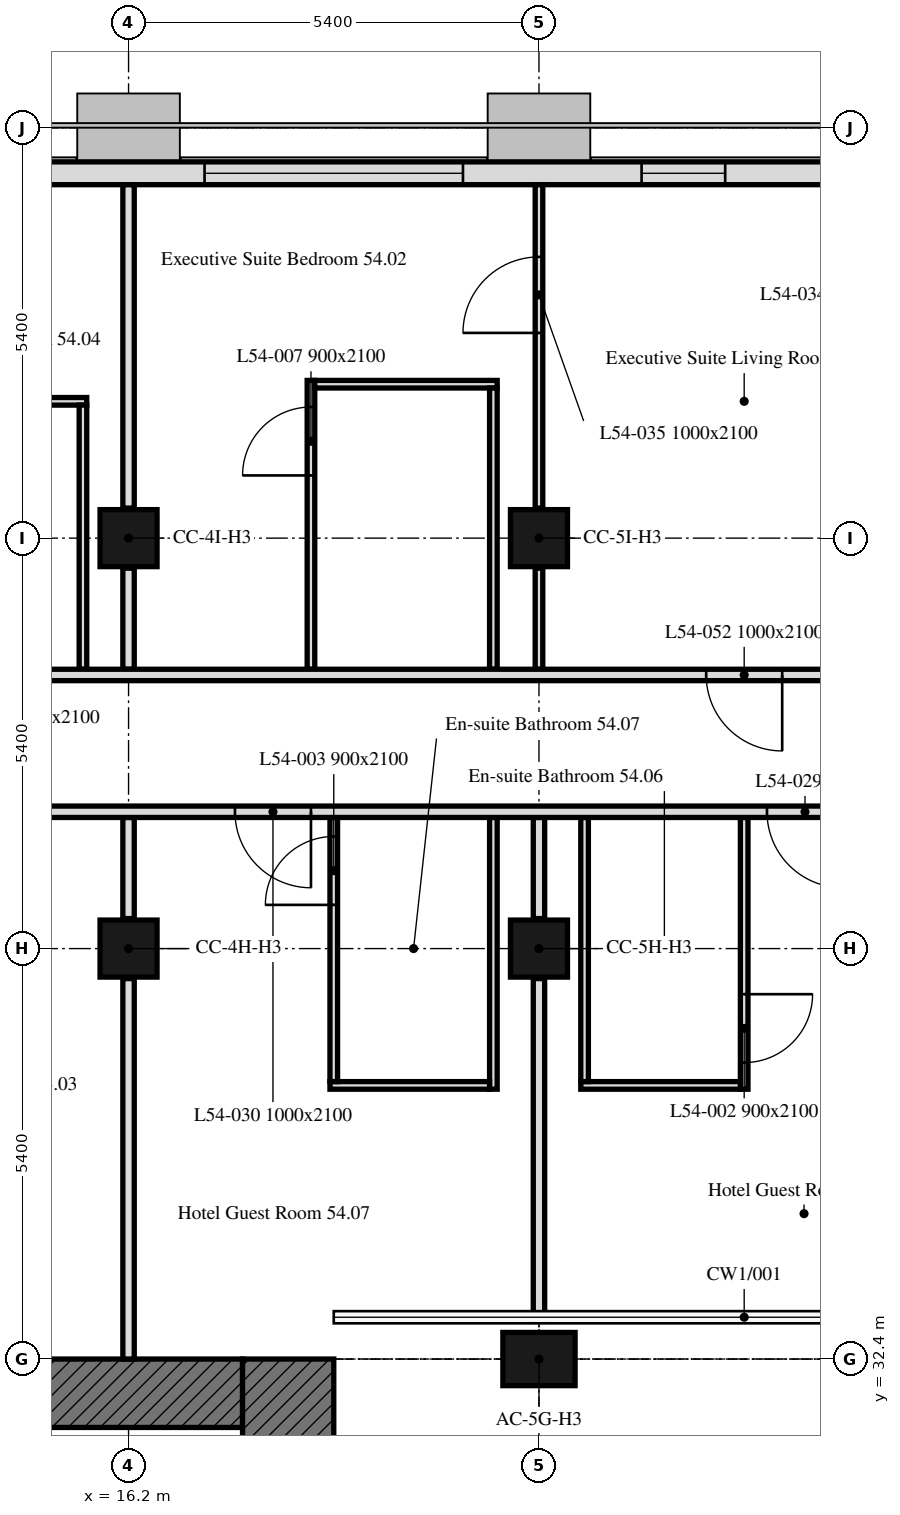
"""IFC4 building model, lengths in metres.
Left out: names, types, materials, properties, quantities, classifications, styles, units other than length and angle.
Written with IfcOpenShell. Run it as: python <this file> out.ifc"""

import sys

from ifc_helpers import new_model, si_unit, direction, frame, frame_2d, origin, origin_2d, place, context, subcontext, project, spatial, rectangle, extrude, element, fill, save


model = new_model("IFC4")
c1 = context("Model", 3, precision=1e-05, world=origin(), true_north=direction((0.0, 1.0)))
c2 = subcontext(c1, "Body", "Model", "MODEL_VIEW")
j1 = project(units=[si_unit("LENGTHUNIT", "METRE"), si_unit("PLANEANGLEUNIT", "RADIAN")], contexts=[c1])
p1 = place(None, origin())
s1 = spatial("IfcSite", under=j1, at=p1, CompositionType="ELEMENT")
p2 = place(p1, origin())
s2 = spatial("IfcBuilding", under=s1, at=p2, CompositionType="ELEMENT")
p3 = place(p2, frame((0.0, 0.0, 217.0)))
s3 = spatial("IfcBuildingStorey", under=s2, at=p3, CompositionType="ELEMENT", Elevation=217.0)
p4 = place(p3, frame((21.6, 32.4, 0.0), z_axis=(0.0, 0.0, 1.0), x_axis=(1.0, 0.0, 0.0)))
e1 = element("IfcColumn", 1, at=p4, inside=s3, PredefinedType="COLUMN", context=c2, shape_type="SweptSolid", body=[
    extrude(rectangle(XDim=0.95, YDim=0.7, at=origin_2d()), origin(), (0.0, 0.0, 1.0), 3.0),
])
for number, where, z_axis, x_axis in (
    (2, (16.2, 37.8, 0.0), (0.0, 0.0, 1.0), (1.0, 0.0, 0.0)),
    (3, (21.6, 37.8, 0.0), (0.0, 0.0, 1.0), (1.0, 0.0, 0.0)),
    (4, (16.2, 43.2, 0.0), (0.0, 0.0, 1.0), (1.0, 0.0, 0.0)),
    (5, (21.6, 43.2, 0.0), (0.0, 0.0, 1.0), (1.0, 0.0, 0.0)),
):
    element("IfcColumn", number, at=place(p3, frame(where, z_axis=z_axis, x_axis=x_axis)), inside=s3, PredefinedType="COLUMN", context=c2, shape_type="SweptSolid", body=[
        extrude(rectangle(XDim=0.75, YDim=0.75, at=origin_2d()), origin(), (0.0, 0.0, 1.0), 3.0),
    ])
p5 = place(p3, frame((37.614, 48.0, 0.0), z_axis=(0.0, 0.0, 1.0), x_axis=(-1.0, 0.0, 0.0)))
e6 = element("IfcWall", 6, at=p5, inside=s3, PredefinedType="SOLIDWALL", context=c2, shape_type="SweptSolid", body=[
    extrude(rectangle(XDim=32.027, YDim=0.3, at=frame_2d((16.014, 0.0))), origin(), (0.0, 0.0, 1.0), 3.0),
])
p6 = place(p5, frame((2.764, 0.0, 0.9)))
e7 = element("IfcOpeningElement", 7, at=p6, cuts=e6, PredefinedType="OPENING", context=c2, shape_type="SweptSolid", body=[
    extrude(rectangle(XDim=1.1, YDim=1.7, at=frame_2d((0.55, 0.85))), frame((0.0, 0.16, 0.0), z_axis=(0.0, -1.0, 0.0), x_axis=(1.0, 0.0, 0.0)), (0.0, 0.0, 1.0), 0.32),
])
p7 = place(p5, frame((6.214, 0.0, 0.9)))
e8 = element("IfcOpeningElement", 8, at=p7, cuts=e6, PredefinedType="OPENING", context=c2, shape_type="SweptSolid", body=[
    extrude(rectangle(XDim=3.4, YDim=1.7, at=frame_2d((1.7, 0.85))), frame((0.0, 0.16, 0.0), z_axis=(0.0, -1.0, 0.0), x_axis=(1.0, 0.0, 0.0)), (0.0, 0.0, 1.0), 0.32),
])
p8 = place(p5, frame((13.564, 0.0, 0.9)))
e9 = element("IfcOpeningElement", 9, at=p8, cuts=e6, PredefinedType="OPENING", context=c2, shape_type="SweptSolid", body=[
    extrude(rectangle(XDim=1.1, YDim=1.7, at=frame_2d((0.55, 0.85))), frame((0.0, 0.16, 0.0), z_axis=(0.0, -1.0, 0.0), x_axis=(1.0, 0.0, 0.0)), (0.0, 0.0, 1.0), 0.32),
])
p9 = place(p5, frame((17.014, 0.0, 0.9)))
e10 = element("IfcOpeningElement", 10, at=p9, cuts=e6, PredefinedType="OPENING", context=c2, shape_type="SweptSolid", body=[
    extrude(rectangle(XDim=3.4, YDim=1.7, at=frame_2d((1.7, 0.85))), frame((0.0, 0.16, 0.0), z_axis=(0.0, -1.0, 0.0), x_axis=(1.0, 0.0, 0.0)), (0.0, 0.0, 1.0), 0.32),
])
p10 = place(p5, frame((24.364, 0.0, 0.9)))
e11 = element("IfcOpeningElement", 11, at=p10, cuts=e6, PredefinedType="OPENING", context=c2, shape_type="SweptSolid", body=[
    extrude(rectangle(XDim=1.1, YDim=1.7, at=frame_2d((0.55, 0.85))), frame((0.0, 0.16, 0.0), z_axis=(0.0, -1.0, 0.0), x_axis=(1.0, 0.0, 0.0)), (0.0, 0.0, 1.0), 0.32),
])
p11 = place(p5, frame((27.814, 0.0, 0.9)))
e12 = element("IfcOpeningElement", 12, at=p11, cuts=e6, PredefinedType="OPENING", context=c2, shape_type="SweptSolid", body=[
    extrude(rectangle(XDim=3.4, YDim=1.7, at=frame_2d((1.7, 0.85))), frame((0.0, 0.16, 0.0), z_axis=(0.0, -1.0, 0.0), x_axis=(1.0, 0.0, 0.0)), (0.0, 0.0, 1.0), 0.32),
])
p12 = place(p3, frame((6.6, 31.95, 0.0), z_axis=(0.0, 0.0, 1.0), x_axis=(1.0, 0.0, 0.0)))
e13 = element("IfcWall", 13, at=p12, inside=s3, PredefinedType="SOLIDWALL", context=c2, shape_type="SweptSolid", body=[
    extrude(rectangle(XDim=11.1, YDim=0.9, at=frame_2d((5.55, 0.0))), origin(), (0.0, 0.0, 1.0), 3.0),
])
p13 = place(p12, frame((3.55, 0.0, 0.0)))
e14 = element("IfcOpeningElement", 14, at=p13, cuts=e13, PredefinedType="OPENING", context=c2, shape_type="SweptSolid", body=[
    extrude(rectangle(XDim=2.0, YDim=2.4, at=frame_2d((1.0, 1.2))), frame((0.0, 0.45, 0.0), z_axis=(0.0, -1.0, 0.0), x_axis=(1.0, 0.0, 0.0)), (0.0, 0.0, 1.0), 0.9),
])
p14 = place(p3, frame((18.3, 32.4, 0.0), z_axis=(0.0, 0.0, 1.0), x_axis=(0.0, -1.0, 0.0)))
e15 = element("IfcWall", 15, at=p14, inside=s3, PredefinedType="SOLIDWALL", context=c2, shape_type="SweptSolid", body=[
    extrude(rectangle(XDim=16.2, YDim=1.2, at=frame_2d((8.1, 0.0))), origin(), (0.0, 0.0, 1.0), 3.0),
])
p15 = place(p3, frame((24.3, 39.525, 0.0), z_axis=(0.0, 0.0, 1.0), x_axis=(0.0, -1.0, 0.0)))
e16 = element("IfcWall", 16, at=p15, inside=s3, PredefinedType="PARTITIONING", context=c2, shape_type="SweptSolid", body=[
    extrude(rectangle(XDim=3.575, YDim=0.1, at=frame_2d((1.788, 0.0))), origin(), (0.0, 0.0, 1.0), 3.0),
])
p16 = place(p15, frame((2.325, 0.0, 0.0)))
e17 = element("IfcOpeningElement", 17, at=p16, cuts=e16, PredefinedType="OPENING", context=c2, shape_type="SweptSolid", body=[
    extrude(rectangle(XDim=0.9, YDim=2.1, at=frame_2d((0.45, 1.05))), frame((0.0, 0.05, 0.0), z_axis=(0.0, -1.0, 0.0), x_axis=(1.0, 0.0, 0.0)), (0.0, 0.0, 1.0), 0.1),
])
p17 = place(p3, frame((24.25, 36.0, 0.0), z_axis=(0.0, 0.0, 1.0), x_axis=(-1.0, 0.0, 0.0)))
e18 = element("IfcWall", 18, at=p17, inside=s3, PredefinedType="PARTITIONING", context=c2, shape_type="SweptSolid", body=[
    extrude(rectangle(XDim=2.1, YDim=0.1, at=frame_2d((1.05, 0.0))), origin(), (0.0, 0.0, 1.0), 3.0),
])
p18 = place(p3, frame((22.2, 36.05, 0.0), z_axis=(0.0, 0.0, 1.0), x_axis=(0.0, 1.0, 0.0)))
e19 = element("IfcWall", 19, at=p18, inside=s3, PredefinedType="PARTITIONING", context=c2, shape_type="SweptSolid", body=[
    extrude(rectangle(XDim=3.475, YDim=0.1, at=frame_2d((1.737, 0.0))), origin(), (0.0, 0.0, 1.0), 3.0),
])
p19 = place(p3, frame((21.6, 39.525, 0.0), z_axis=(0.0, 0.0, 1.0), x_axis=(0.0, -1.0, 0.0)))
e20 = element("IfcWall", 20, at=p19, inside=s3, PredefinedType="PARTITIONING", context=c2, shape_type="SweptSolid", body=[
    extrude(rectangle(XDim=1.33, YDim=0.15, at=frame_2d((0.665, 0.0))), origin(), (0.0, 0.0, 1.0), 2.4),
])
p20 = place(p3, frame((21.6, 37.405, 0.0), z_axis=(0.0, 0.0, 1.0), x_axis=(0.0, -1.0, 0.0)))
e21 = element("IfcWall", 21, at=p20, inside=s3, PredefinedType="PARTITIONING", context=c2, shape_type="SweptSolid", body=[
    extrude(rectangle(XDim=4.51, YDim=0.15, at=frame_2d((2.255, 0.0))), origin(), (0.0, 0.0, 1.0), 2.4),
])
p21 = place(p3, frame((21.0, 39.525, 0.0), z_axis=(0.0, 0.0, 1.0), x_axis=(0.0, -1.0, 0.0)))
e22 = element("IfcWall", 22, at=p21, inside=s3, PredefinedType="PARTITIONING", context=c2, shape_type="SweptSolid", body=[
    extrude(rectangle(XDim=3.575, YDim=0.1, at=frame_2d((1.788, 0.0))), origin(), (0.0, 0.0, 1.0), 3.0),
])
p22 = place(p3, frame((20.95, 36.0, 0.0), z_axis=(0.0, 0.0, 1.0), x_axis=(-1.0, 0.0, 0.0)))
e23 = element("IfcWall", 23, at=p22, inside=s3, PredefinedType="PARTITIONING", context=c2, shape_type="SweptSolid", body=[
    extrude(rectangle(XDim=2.1, YDim=0.1, at=frame_2d((1.05, 0.0))), origin(), (0.0, 0.0, 1.0), 3.0),
])
p23 = place(p3, frame((18.9, 36.05, 0.0), z_axis=(0.0, 0.0, 1.0), x_axis=(0.0, 1.0, 0.0)))
e24 = element("IfcWall", 24, at=p23, inside=s3, PredefinedType="PARTITIONING", context=c2, shape_type="SweptSolid", body=[
    extrude(rectangle(XDim=3.475, YDim=0.1, at=frame_2d((1.737, 0.0))), origin(), (0.0, 0.0, 1.0), 3.0),
])
p24 = place(p23, frame((2.325, 0.0, 0.0)))
e25 = element("IfcOpeningElement", 25, at=p24, cuts=e24, PredefinedType="OPENING", context=c2, shape_type="SweptSolid", body=[
    extrude(rectangle(XDim=0.9, YDim=2.1, at=frame_2d((0.45, 1.05))), frame((0.0, 0.05, 0.0), z_axis=(0.0, -1.0, 0.0), x_axis=(1.0, 0.0, 0.0)), (0.0, 0.0, 1.0), 0.1),
])
p25 = place(p3, frame((16.2, 39.525, 0.0), z_axis=(0.0, 0.0, 1.0), x_axis=(0.0, -1.0, 0.0)))
e26 = element("IfcWall", 26, at=p25, inside=s3, PredefinedType="PARTITIONING", context=c2, shape_type="SweptSolid", body=[
    extrude(rectangle(XDim=1.33, YDim=0.15, at=frame_2d((0.665, 0.0))), origin(), (0.0, 0.0, 1.0), 2.4),
])
p26 = place(p3, frame((16.2, 37.405, 0.0), z_axis=(0.0, 0.0, 1.0), x_axis=(0.0, -1.0, 0.0)))
e27 = element("IfcWall", 27, at=p26, inside=s3, PredefinedType="PARTITIONING", context=c2, shape_type="SweptSolid", body=[
    extrude(rectangle(XDim=5.005, YDim=0.15, at=frame_2d((2.502, 0.0))), origin(), (0.0, 0.0, 1.0), 2.4),
])
p27 = place(p3, frame((16.2, 47.849, 0.0), z_axis=(0.0, 0.0, 1.0), x_axis=(0.0, -1.0, 0.0)))
e28 = element("IfcWall", 28, at=p27, inside=s3, PredefinedType="PARTITIONING", context=c2, shape_type="SweptSolid", body=[
    extrude(rectangle(XDim=4.254, YDim=0.15, at=frame_2d((2.127, 0.0))), origin(), (0.0, 0.0, 1.0), 2.4),
])
p28 = place(p3, frame((16.2, 42.805, 0.0), z_axis=(0.0, 0.0, 1.0), x_axis=(0.0, -1.0, 0.0)))
e29 = element("IfcWall", 29, at=p28, inside=s3, PredefinedType="PARTITIONING", context=c2, shape_type="SweptSolid", body=[
    extrude(rectangle(XDim=1.33, YDim=0.15, at=frame_2d((0.665, 0.0))), origin(), (0.0, 0.0, 1.0), 2.4),
])
p29 = place(p3, frame((18.6, 41.475, 0.0), z_axis=(0.0, 0.0, 1.0), x_axis=(0.0, 1.0, 0.0)))
e30 = element("IfcWall", 30, at=p29, inside=s3, PredefinedType="PARTITIONING", context=c2, shape_type="SweptSolid", body=[
    extrude(rectangle(XDim=3.8, YDim=0.1, at=frame_2d((1.9, 0.0))), origin(), (0.0, 0.0, 1.0), 3.0),
])
p30 = place(p29, frame((2.55, 0.0, 0.0)))
e31 = element("IfcOpeningElement", 31, at=p30, cuts=e30, PredefinedType="OPENING", context=c2, shape_type="SweptSolid", body=[
    extrude(rectangle(XDim=0.9, YDim=2.1, at=frame_2d((0.45, 1.05))), frame((0.0, 0.05, 0.0), z_axis=(0.0, -1.0, 0.0), x_axis=(1.0, 0.0, 0.0)), (0.0, 0.0, 1.0), 0.1),
])
p31 = place(p3, frame((18.65, 45.225, 0.0), z_axis=(0.0, 0.0, 1.0), x_axis=(1.0, 0.0, 0.0)))
e32 = element("IfcWall", 32, at=p31, inside=s3, PredefinedType="PARTITIONING", context=c2, shape_type="SweptSolid", body=[
    extrude(rectangle(XDim=2.4, YDim=0.1, at=frame_2d((1.2, 0.0))), origin(), (0.0, 0.0, 1.0), 3.0),
])
p32 = place(p3, frame((21.0, 45.175, 0.0), z_axis=(0.0, 0.0, 1.0), x_axis=(0.0, -1.0, 0.0)))
e33 = element("IfcWall", 33, at=p32, inside=s3, PredefinedType="PARTITIONING", context=c2, shape_type="SweptSolid", body=[
    extrude(rectangle(XDim=3.7, YDim=0.1, at=frame_2d((1.85, 0.0))), origin(), (0.0, 0.0, 1.0), 3.0),
])
p33 = place(p3, frame((21.6, 41.475, 0.0), z_axis=(0.0, 0.0, 1.0), x_axis=(0.0, 1.0, 0.0)))
e34 = element("IfcWall", 34, at=p33, inside=s3, PredefinedType="PARTITIONING", context=c2, shape_type="SweptSolid", body=[
    extrude(rectangle(XDim=1.33, YDim=0.1, at=frame_2d((0.665, 0.0))), origin(), (0.0, 0.0, 1.0), 2.4),
])
p34 = place(p3, frame((21.6, 43.595, 0.0), z_axis=(0.0, 0.0, 1.0), x_axis=(0.0, 1.0, 0.0)))
e35 = element("IfcWall", 35, at=p34, inside=s3, PredefinedType="PARTITIONING", context=c2, shape_type="SweptSolid", body=[
    extrude(rectangle(XDim=4.254, YDim=0.1, at=frame_2d((2.127, 0.0))), origin(), (0.0, 0.0, 1.0), 2.4),
])
p35 = place(p34, frame((2.305, 0.0, 0.0)))
e36 = element("IfcOpeningElement", 36, at=p35, cuts=e35, PredefinedType="OPENING", context=c2, shape_type="SweptSolid", body=[
    extrude(rectangle(XDim=1.0, YDim=2.1, at=frame_2d((0.5, 1.05))), frame((0.0, 0.05, 0.0), z_axis=(0.0, -1.0, 0.0), x_axis=(1.0, 0.0, 0.0)), (0.0, 0.0, 1.0), 0.1),
])
p36 = place(p3, frame((13.55, 45.0, 0.0), z_axis=(0.0, 0.0, 1.0), x_axis=(1.0, 0.0, 0.0)))
e37 = element("IfcWall", 37, at=p36, inside=s3, PredefinedType="PARTITIONING", context=c2, shape_type="SweptSolid", body=[
    extrude(rectangle(XDim=2.1, YDim=0.1, at=frame_2d((1.05, 0.0))), origin(), (0.0, 0.0, 1.0), 3.0),
])
p37 = place(p3, frame((15.6, 44.95, 0.0), z_axis=(0.0, 0.0, 1.0), x_axis=(0.0, -1.0, 0.0)))
e38 = element("IfcWall", 38, at=p37, inside=s3, PredefinedType="PARTITIONING", context=c2, shape_type="SweptSolid", body=[
    extrude(rectangle(XDim=3.475, YDim=0.1, at=frame_2d((1.737, 0.0))), origin(), (0.0, 0.0, 1.0), 3.0),
])
p38 = place(p3, frame((42.449, 41.4, 0.0), z_axis=(0.0, 0.0, 1.0), x_axis=(-1.0, 0.0, 0.0)))
e39 = element("IfcWall", 39, at=p38, inside=s3, PredefinedType="PARTITIONING", context=c2, shape_type="SweptSolid", body=[
    extrude(rectangle(XDim=41.698, YDim=0.15, at=frame_2d((20.849, 0.0))), origin(), (0.0, 0.0, 1.0), 2.4),
])
p39 = place(p38, frame((1.449, 0.0, 0.0)))
e40 = element("IfcOpeningElement", 40, at=p39, cuts=e39, PredefinedType="OPENING", context=c2, shape_type="SweptSolid", body=[
    extrude(rectangle(XDim=1.0, YDim=2.1, at=frame_2d((0.5, 1.05))), frame((0.0, 0.075, 0.0), z_axis=(0.0, -1.0, 0.0), x_axis=(1.0, 0.0, 0.0)), (0.0, 0.0, 1.0), 0.15),
])
p40 = place(p38, frame((29.249, 0.0, 0.0)))
e41 = element("IfcOpeningElement", 41, at=p40, cuts=e39, PredefinedType="OPENING", context=c2, shape_type="SweptSolid", body=[
    extrude(rectangle(XDim=1.0, YDim=2.1, at=frame_2d((0.5, 1.05))), frame((0.0, 0.075, 0.0), z_axis=(0.0, -1.0, 0.0), x_axis=(1.0, 0.0, 0.0)), (0.0, 0.0, 1.0), 0.15),
])
p41 = place(p38, frame((37.599, 0.0, 0.0)))
e42 = element("IfcOpeningElement", 42, at=p41, cuts=e39, PredefinedType="OPENING", context=c2, shape_type="SweptSolid", body=[
    extrude(rectangle(XDim=1.0, YDim=2.1, at=frame_2d((0.5, 1.05))), frame((0.0, 0.075, 0.0), z_axis=(0.0, -1.0, 0.0), x_axis=(1.0, 0.0, 0.0)), (0.0, 0.0, 1.0), 0.15),
])
p42 = place(p38, frame((17.649, 0.0, 0.0)))
e43 = element("IfcOpeningElement", 43, at=p42, cuts=e39, PredefinedType="OPENING", context=c2, shape_type="SweptSolid", body=[
    extrude(rectangle(XDim=1.0, YDim=2.1, at=frame_2d((0.5, 1.05))), frame((0.0, 0.075, 0.0), z_axis=(0.0, -1.0, 0.0), x_axis=(1.0, 0.0, 0.0)), (0.0, 0.0, 1.0), 0.15),
])
p43 = place(p3, frame((41.374, 39.6, 0.0), z_axis=(0.0, 0.0, 1.0), x_axis=(-1.0, 0.0, 0.0)))
e44 = element("IfcWall", 44, at=p43, inside=s3, PredefinedType="PARTITIONING", context=c2, shape_type="SweptSolid", body=[
    extrude(rectangle(XDim=35.899, YDim=0.15, at=frame_2d((17.949, 0.0))), origin(), (0.0, 0.0, 1.0), 2.4),
])
p44 = place(p43, frame((0.25, 0.0, 0.0)))
e45 = element("IfcOpeningElement", 45, at=p44, cuts=e44, PredefinedType="OPENING", context=c2, shape_type="SweptSolid", body=[
    extrude(rectangle(XDim=1.0, YDim=2.1, at=frame_2d((0.5, 1.05))), frame((0.0, 0.075, 0.0), z_axis=(0.0, -1.0, 0.0), x_axis=(1.0, 0.0, 0.0)), (0.0, 0.0, 1.0), 0.15),
])
p45 = place(p43, frame((27.124, 0.0, 0.0)))
e46 = element("IfcOpeningElement", 46, at=p45, cuts=e44, PredefinedType="OPENING", context=c2, shape_type="SweptSolid", body=[
    extrude(rectangle(XDim=1.0, YDim=2.1, at=frame_2d((0.5, 1.05))), frame((0.0, 0.075, 0.0), z_axis=(0.0, -1.0, 0.0), x_axis=(1.0, 0.0, 0.0)), (0.0, 0.0, 1.0), 0.15),
])
p46 = place(p43, frame((6.024, 0.0, 0.0)))
e47 = element("IfcOpeningElement", 47, at=p46, cuts=e44, PredefinedType="OPENING", context=c2, shape_type="SweptSolid", body=[
    extrude(rectangle(XDim=1.0, YDim=2.1, at=frame_2d((0.5, 1.05))), frame((0.0, 0.075, 0.0), z_axis=(0.0, -1.0, 0.0), x_axis=(1.0, 0.0, 0.0)), (0.0, 0.0, 1.0), 0.15),
])
p47 = place(p43, frame((11.974, 0.0, 0.0)))
e48 = element("IfcOpeningElement", 48, at=p47, cuts=e44, PredefinedType="OPENING", context=c2, shape_type="SweptSolid", body=[
    extrude(rectangle(XDim=1.0, YDim=2.1, at=frame_2d((0.5, 1.05))), frame((0.0, 0.075, 0.0), z_axis=(0.0, -1.0, 0.0), x_axis=(1.0, 0.0, 0.0)), (0.0, 0.0, 1.0), 0.15),
])
p48 = place(p43, frame((15.774, 0.0, 0.0)))
e49 = element("IfcOpeningElement", 49, at=p48, cuts=e44, PredefinedType="OPENING", context=c2, shape_type="SweptSolid", body=[
    extrude(rectangle(XDim=1.0, YDim=2.1, at=frame_2d((0.5, 1.05))), frame((0.0, 0.075, 0.0), z_axis=(0.0, -1.0, 0.0), x_axis=(1.0, 0.0, 0.0)), (0.0, 0.0, 1.0), 0.15),
])
p49 = place(p43, frame((22.774, 0.0, 0.0)))
e50 = element("IfcOpeningElement", 50, at=p49, cuts=e44, PredefinedType="OPENING", context=c2, shape_type="SweptSolid", body=[
    extrude(rectangle(XDim=1.0, YDim=2.1, at=frame_2d((0.5, 1.05))), frame((0.0, 0.075, 0.0), z_axis=(0.0, -1.0, 0.0), x_axis=(1.0, 0.0, 0.0)), (0.0, 0.0, 1.0), 0.15),
])
p50 = place(p43, frame((3.754, 0.0, 0.0)))
e51 = element("IfcOpeningElement", 51, at=p50, cuts=e44, PredefinedType="OPENING", context=c2, shape_type="SweptSolid", body=[
    extrude(rectangle(XDim=1.8, YDim=2.4, at=frame_2d((0.9, 1.2))), frame((0.0, 0.075, 0.0), z_axis=(0.0, -1.0, 0.0), x_axis=(1.0, 0.0, 0.0)), (0.0, 0.0, 1.0), 0.15),
])
p51 = place(p43, frame((29.124, 0.0, 0.0)))
e52 = element("IfcOpeningElement", 52, at=p51, cuts=e44, PredefinedType="OPENING", context=c2, shape_type="SweptSolid", body=[
    extrude(rectangle(XDim=1.0, YDim=2.1, at=frame_2d((0.5, 1.05))), frame((0.0, 0.075, 0.0), z_axis=(0.0, -1.0, 0.0), x_axis=(1.0, 0.0, 0.0)), (0.0, 0.0, 1.0), 0.15),
])
p52 = place(p8, origin())
e53 = element("IfcWindow", 53, at=p52, inside=s3, PartitioningType="SINGLE_PANEL", PredefinedType="WINDOW", context=c2, shape_type="SweptSolid", body=[
    extrude(rectangle(XDim=1.1, YDim=1.7, at=frame_2d((0.55, 0.85))), frame((0.0, 0.03, 0.0), z_axis=(0.0, -1.0, 0.0), x_axis=(1.0, 0.0, 0.0)), (0.0, 0.0, 1.0), 0.06),
])
fill(e9, e53)
p53 = place(p9, origin())
e54 = element("IfcWindow", 54, at=p53, inside=s3, PartitioningType="SINGLE_PANEL", PredefinedType="WINDOW", context=c2, shape_type="SweptSolid", body=[
    extrude(rectangle(XDim=3.4, YDim=1.7, at=frame_2d((1.7, 0.85))), frame((0.0, 0.03, 0.0), z_axis=(0.0, -1.0, 0.0), x_axis=(1.0, 0.0, 0.0)), (0.0, 0.0, 1.0), 0.06),
])
fill(e10, e54)
p54 = place(p16, origin())
e55 = element("IfcDoor", 55, at=p54, inside=s3, OperationType="SINGLE_SWING_RIGHT", PredefinedType="DOOR", context=c2, shape_type="SweptSolid", body=[
    extrude(rectangle(XDim=0.9, YDim=2.1, at=frame_2d((0.45, 1.05))), frame((0.0, 0.025, 0.0), z_axis=(0.0, -1.0, 0.0), x_axis=(1.0, 0.0, 0.0)), (0.0, 0.0, 1.0), 0.05),
])
fill(e17, e55)
p55 = place(p24, origin())
e56 = element("IfcDoor", 56, at=p55, inside=s3, OperationType="SINGLE_SWING_LEFT", PredefinedType="DOOR", context=c2, shape_type="SweptSolid", body=[
    extrude(rectangle(XDim=0.9, YDim=2.1, at=frame_2d((0.45, 1.05))), frame((0.0, 0.025, 0.0), z_axis=(0.0, -1.0, 0.0), x_axis=(1.0, 0.0, 0.0)), (0.0, 0.0, 1.0), 0.05),
])
fill(e25, e56)
p56 = place(p30, origin())
e57 = element("IfcDoor", 57, at=p56, inside=s3, OperationType="SINGLE_SWING_LEFT", PredefinedType="DOOR", context=c2, shape_type="SweptSolid", body=[
    extrude(rectangle(XDim=0.9, YDim=2.1, at=frame_2d((0.45, 1.05))), frame((0.0, 0.025, 0.0), z_axis=(0.0, -1.0, 0.0), x_axis=(1.0, 0.0, 0.0)), (0.0, 0.0, 1.0), 0.05),
])
fill(e31, e57)
p57 = place(p48, origin())
e58 = element("IfcDoor", 58, at=p57, inside=s3, OperationType="SINGLE_SWING_RIGHT", PredefinedType="DOOR", context=c2, shape_type="SweptSolid", body=[
    extrude(rectangle(XDim=1.0, YDim=2.1, at=frame_2d((0.5, 1.05))), frame((0.0, 0.025, 0.0), z_axis=(0.0, -1.0, 0.0), x_axis=(1.0, 0.0, 0.0)), (0.0, 0.0, 1.0), 0.05),
])
fill(e49, e58)
p58 = place(p49, origin())
e59 = element("IfcDoor", 59, at=p58, inside=s3, OperationType="SINGLE_SWING_LEFT", PredefinedType="DOOR", context=c2, shape_type="SweptSolid", body=[
    extrude(rectangle(XDim=1.0, YDim=2.1, at=frame_2d((0.5, 1.05))), frame((0.0, 0.025, 0.0), z_axis=(0.0, -1.0, 0.0), x_axis=(1.0, 0.0, 0.0)), (0.0, 0.0, 1.0), 0.05),
])
fill(e50, e59)
p59 = place(p35, origin())
e60 = element("IfcDoor", 60, at=p59, inside=s3, OperationType="SINGLE_SWING_RIGHT", PredefinedType="DOOR", context=c2, shape_type="SweptSolid", body=[
    extrude(rectangle(XDim=1.0, YDim=2.1, at=frame_2d((0.5, 1.05))), frame((0.0, 0.025, 0.0), z_axis=(0.0, -1.0, 0.0), x_axis=(1.0, 0.0, 0.0)), (0.0, 0.0, 1.0), 0.05),
])
fill(e36, e60)
p60 = place(p42, origin())
e61 = element("IfcDoor", 61, at=p60, inside=s3, OperationType="SINGLE_SWING_RIGHT", PredefinedType="DOOR", context=c2, shape_type="SweptSolid", body=[
    extrude(rectangle(XDim=1.0, YDim=2.1, at=frame_2d((0.5, 1.05))), frame((0.0, 0.025, 0.0), z_axis=(0.0, -1.0, 0.0), x_axis=(1.0, 0.0, 0.0)), (0.0, 0.0, 1.0), 0.05),
])
fill(e43, e61)
save(model, sys.argv[1])
